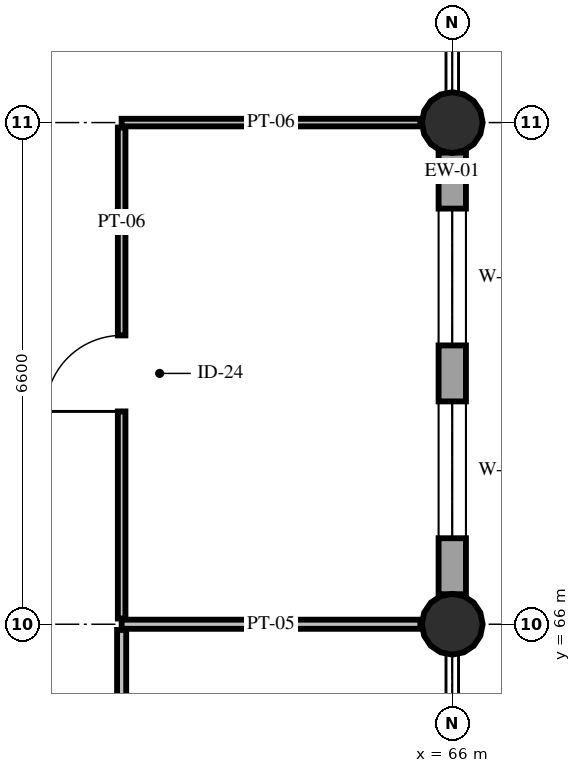
"""IFC4 building model, lengths in metres.
Left out: names, types, materials, properties, quantities, classifications, styles, units other than length and angle.
Written with IfcOpenShell. Run it as: python <this file> out.ifc"""

import sys

from ifc_helpers import new_model, si_unit, direction, frame, frame_2d, origin, origin_2d, place, context, subcontext, project, spatial, rectangle, circle, extrude, element, fill, save


model = new_model("IFC4")
c1 = context("Model", 3, precision=1e-05, world=origin(), true_north=direction((0.0, 1.0)))
c2 = subcontext(c1, "Body", "Model", "MODEL_VIEW")
j1 = project(units=[si_unit("LENGTHUNIT", "METRE"), si_unit("PLANEANGLEUNIT", "RADIAN")], contexts=[c1])
p1 = place(None, origin())
s1 = spatial("IfcSite", under=j1, at=p1, CompositionType="ELEMENT")
p2 = place(p1, origin())
s2 = spatial("IfcBuilding", under=s1, at=p2, CompositionType="ELEMENT")
p3 = place(p2, frame((0.0, 0.0, 5.4)))
s3 = spatial("IfcBuildingStorey", under=s2, at=p3, CompositionType="ELEMENT", Elevation=5.4)
for number, where, z_axis, x_axis in (
    (1, (66.0, 66.0, 0.0), (0.0, 0.0, 1.0), (1.0, 0.0, 0.0)),
    (2, (66.0, 72.6, 0.0), (0.0, 0.0, 1.0), (1.0, 0.0, 0.0)),
):
    element("IfcColumn", number, at=place(p3, frame(where, z_axis=z_axis, x_axis=x_axis)), inside=s3, PredefinedType="COLUMN", context=c2, shape_type="SweptSolid", body=[
        extrude(circle(Radius=0.4, at=origin_2d()), origin(), (0.0, 0.0, 1.0), 4.8),
    ])
p4 = place(p3, frame((66.0, 72.205, 0.0), z_axis=(0.0, 0.0, 1.0), x_axis=(0.0, -1.0, 0.0)))
e3 = element("IfcWall", 3, at=p4, inside=s3, PredefinedType="STANDARD", context=c2, shape_type="SweptSolid", body=[
    extrude(rectangle(XDim=5.81, YDim=0.36, at=frame_2d((2.905, 0.0))), origin(), (0.0, 0.0, 1.0), 3.95),
])
p5 = place(p4, frame((0.737, 0.0, 0.85)))
e4 = element("IfcOpeningElement", 4, at=p5, cuts=e3, PredefinedType="OPENING", context=c2, shape_type="SweptSolid", body=[
    extrude(rectangle(XDim=1.8, YDim=1.86, at=frame_2d((0.9, 0.93))), frame((0.0, 0.195, 0.0), z_axis=(0.0, -1.0, 0.0), x_axis=(1.0, 0.0, 0.0)), (0.0, 0.0, 1.0), 0.39),
])
p6 = place(p4, frame((3.273, 0.0, 0.85)))
e5 = element("IfcOpeningElement", 5, at=p6, cuts=e3, PredefinedType="OPENING", context=c2, shape_type="SweptSolid", body=[
    extrude(rectangle(XDim=1.8, YDim=1.86, at=frame_2d((0.9, 0.93))), frame((0.0, 0.195, 0.0), z_axis=(0.0, -1.0, 0.0), x_axis=(1.0, 0.0, 0.0)), (0.0, 0.0, 1.0), 0.39),
])
p7 = place(p3, frame((61.65, 66.0, 0.0), z_axis=(0.0, 0.0, 1.0), x_axis=(1.0, 0.0, 0.0)))
e6 = element("IfcWall", 6, at=p7, inside=s3, PredefinedType="PARTITIONING", context=c2, shape_type="SweptSolid", body=[
    extrude(rectangle(XDim=3.93, YDim=0.12, at=frame_2d((1.965, 0.0))), origin(), (0.0, 0.0, 1.0), 4.13),
])
p8 = place(p3, frame((61.65, 51.075, 0.0), z_axis=(0.0, 0.0, 1.0), x_axis=(0.0, 1.0, 0.0)))
e7 = element("IfcWall", 7, at=p8, inside=s3, PredefinedType="PARTITIONING", context=c2, shape_type="SweptSolid", body=[
    extrude(rectangle(XDim=14.85, YDim=0.12, at=frame_2d((7.425, 0.0))), origin(), (0.0, 0.0, 1.0), 4.13),
])
p9 = place(p8, frame((5.585, 0.0, 0.0)))
e8 = element("IfcOpeningElement", 8, at=p9, cuts=e7, PredefinedType="OPENING", context=c2, shape_type="SweptSolid", body=[
    extrude(rectangle(XDim=1.68, YDim=2.3, at=frame_2d((0.84, 1.15))), frame((0.0, 0.075, 0.0), z_axis=(0.0, -1.0, 0.0), x_axis=(1.0, 0.0, 0.0)), (0.0, 0.0, 1.0), 0.15),
])
p10 = place(p3, frame((61.65, 72.6, 0.0), z_axis=(0.0, 0.0, 1.0), x_axis=(1.0, 0.0, 0.0)))
e9 = element("IfcWall", 9, at=p10, inside=s3, PredefinedType="PARTITIONING", context=c2, shape_type="SweptSolid", body=[
    extrude(rectangle(XDim=3.93, YDim=0.1, at=frame_2d((1.965, 0.0))), origin(), (0.0, 0.0, 1.0), 4.13),
])
p11 = place(p3, frame((61.65, 66.075, 0.0), z_axis=(0.0, 0.0, 1.0), x_axis=(0.0, 1.0, 0.0)))
e10 = element("IfcWall", 10, at=p11, inside=s3, PredefinedType="PARTITIONING", context=c2, shape_type="SweptSolid", body=[
    extrude(rectangle(XDim=6.46, YDim=0.1, at=frame_2d((3.23, 0.0))), origin(), (0.0, 0.0, 1.0), 4.13),
])
p12 = place(p11, frame((2.725, 0.0, 0.0)))
e11 = element("IfcOpeningElement", 11, at=p12, cuts=e10, PredefinedType="OPENING", context=c2, shape_type="SweptSolid", body=[
    extrude(rectangle(XDim=1.0, YDim=2.15, at=frame_2d((0.5, 1.075))), frame((0.0, 0.065, 0.0), z_axis=(0.0, -1.0, 0.0), x_axis=(1.0, 0.0, 0.0)), (0.0, 0.0, 1.0), 0.13),
])
p13 = place(p5, origin())
e12 = element("IfcWindow", 12, at=p13, inside=s3, PartitioningType="DOUBLE_PANEL_VERTICAL", PredefinedType="WINDOW", context=c2, shape_type="SweptSolid", body=[
    extrude(rectangle(XDim=1.8, YDim=1.86, at=frame_2d((0.9, 0.93))), frame((0.0, 0.03, 0.0), z_axis=(0.0, -1.0, 0.0), x_axis=(1.0, 0.0, 0.0)), (0.0, 0.0, 1.0), 0.06),
])
fill(e4, e12)
p14 = place(p6, origin())
e13 = element("IfcWindow", 13, at=p14, inside=s3, PartitioningType="DOUBLE_PANEL_VERTICAL", PredefinedType="WINDOW", context=c2, shape_type="SweptSolid", body=[
    extrude(rectangle(XDim=1.8, YDim=1.86, at=frame_2d((0.9, 0.93))), frame((0.0, 0.03, 0.0), z_axis=(0.0, -1.0, 0.0), x_axis=(1.0, 0.0, 0.0)), (0.0, 0.0, 1.0), 0.06),
])
fill(e5, e13)
p15 = place(p12, origin())
e14 = element("IfcDoor", 14, at=p15, inside=s3, OperationType="SINGLE_SWING_LEFT", PredefinedType="DOOR", context=c2, shape_type="SweptSolid", body=[
    extrude(rectangle(XDim=1.0, YDim=2.15, at=frame_2d((0.5, 1.075))), frame((0.0, 0.025, 0.0), z_axis=(0.0, -1.0, 0.0), x_axis=(1.0, 0.0, 0.0)), (0.0, 0.0, 1.0), 0.05),
])
fill(e11, e14)
save(model, sys.argv[1])
